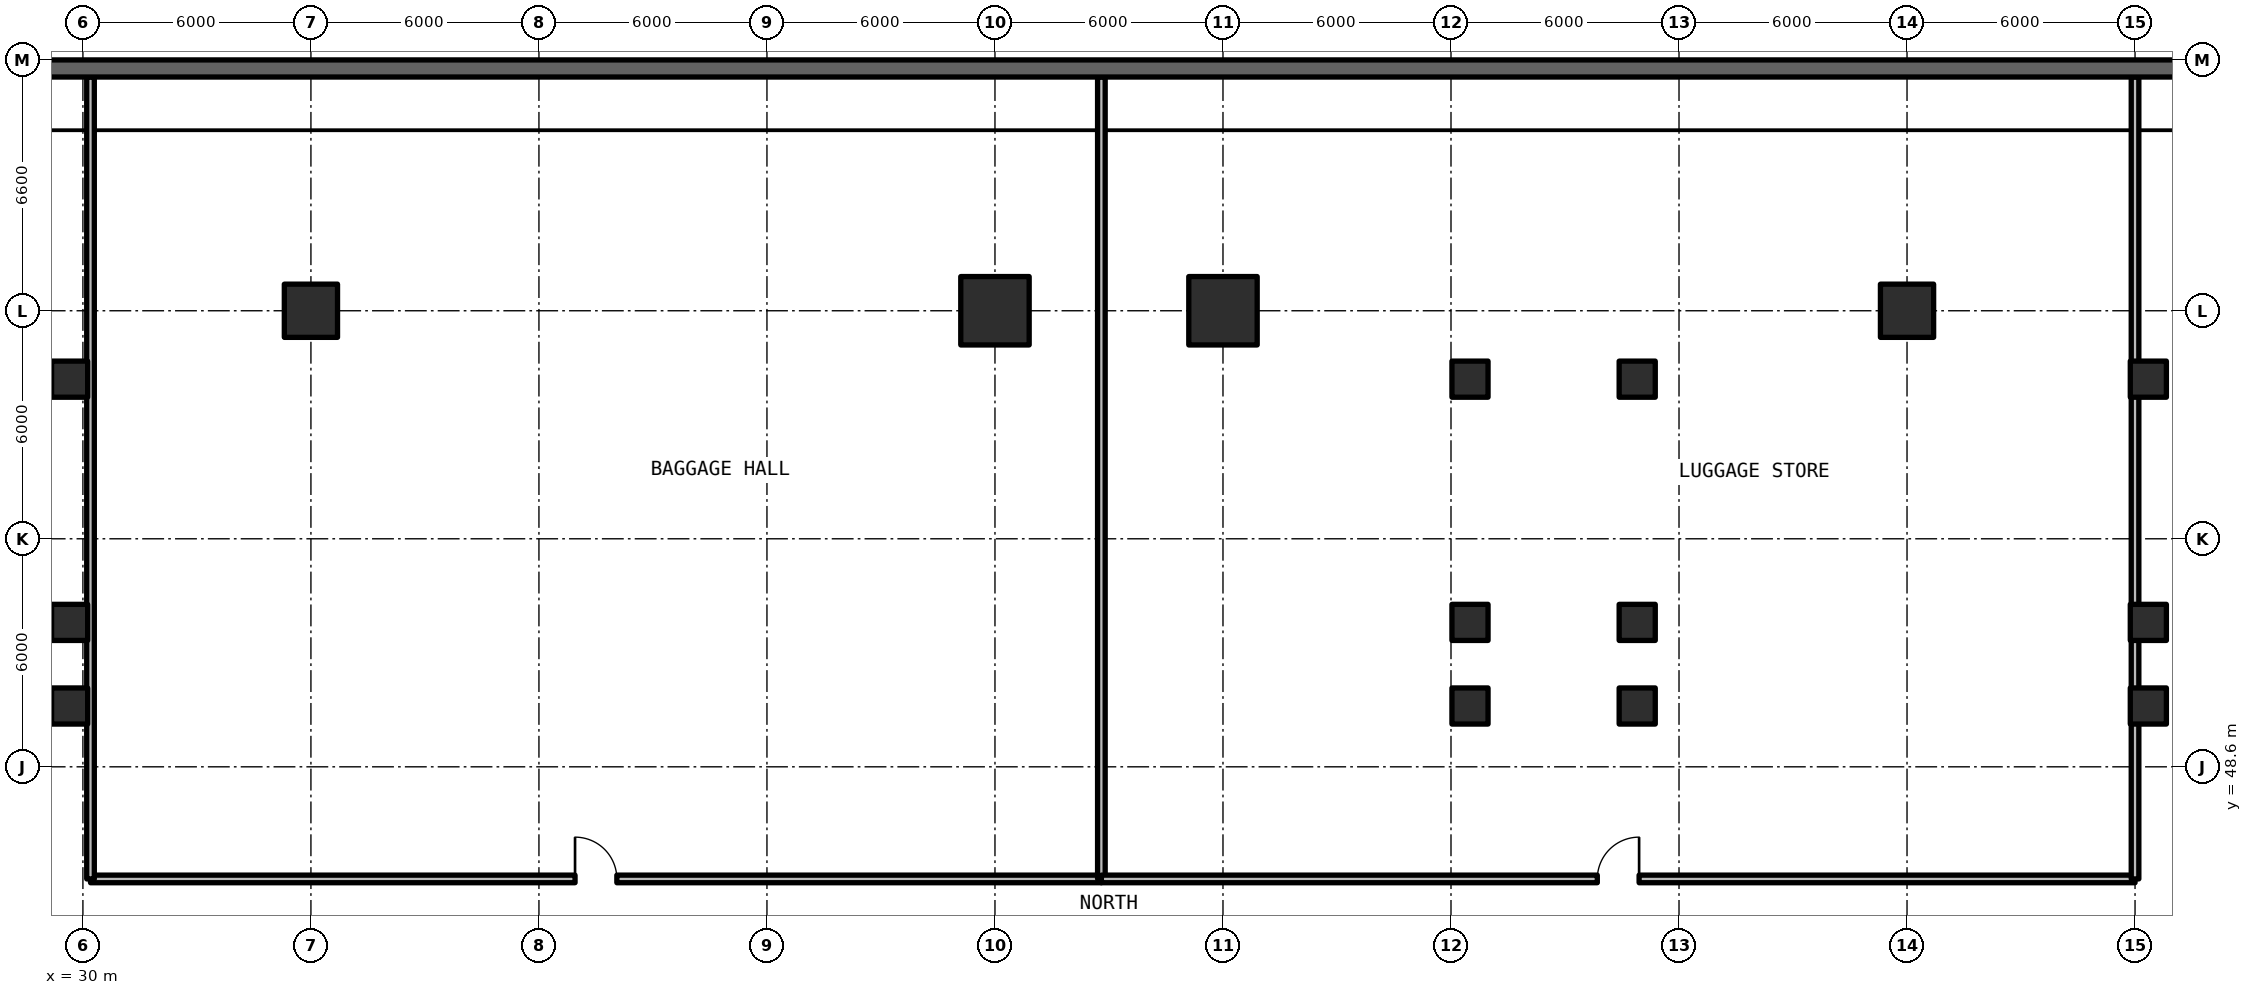
"""IFC4 building model, lengths in metres.
Left out: names, types, materials, properties, quantities, classifications, styles, units other than length and angle.
Written with IfcOpenShell. Run it as: python <this file> out.ifc"""

import sys

from ifc_helpers import new_model, si_unit, direction, frame, frame_2d, origin, origin_2d, place, context, subcontext, project, spatial, rectangle, circle, extrude, element, fill, save


model = new_model("IFC4")
c1 = context("Model", 3, precision=1e-05, world=origin(), true_north=direction((0.0, 1.0)))
c2 = subcontext(c1, "Body", "Model", "MODEL_VIEW")
j1 = project(units=[si_unit("LENGTHUNIT", "METRE"), si_unit("PLANEANGLEUNIT", "RADIAN")], contexts=[c1])
p1 = place(None, origin())
s1 = spatial("IfcSite", under=j1, at=p1, CompositionType="ELEMENT")
p2 = place(p1, origin())
s2 = spatial("IfcBuilding", under=s1, at=p2, CompositionType="ELEMENT")
p3 = place(p2, frame((0.0, 0.0, -9.24)))
s3 = spatial("IfcBuildingStorey", under=s2, at=p3, CompositionType="ELEMENT", Elevation=-9.24)
p4 = place(p3, frame((36.0, 60.6, 0.0), z_axis=(0.0, 0.0, 1.0), x_axis=(1.0, 0.0, 0.0)))
e1 = element("IfcColumn", 1, at=p4, inside=s3, PredefinedType="COLUMN", context=c2, shape_type="SweptSolid", body=[
    extrude(circle(Radius=0.7, at=origin_2d()), origin(), (0.0, 0.0, 1.0), 4.62),
])
for number, where, z_axis, x_axis in (
    (2, (54.0, 60.6, 0.0), (0.0, 0.0, 1.0), (1.0, 0.0, 0.0)),
    (3, (60.0, 60.6, 0.0), (0.0, 0.0, 1.0), (1.0, 0.0, 0.0)),
):
    element("IfcColumn", number, at=place(p3, frame(where, z_axis=z_axis, x_axis=x_axis)), inside=s3, PredefinedType="COLUMN", context=c2, shape_type="SweptSolid", body=[
        extrude(rectangle(XDim=1.8, YDim=1.8, at=origin_2d()), origin(), (0.0, 0.0, 1.0), 4.62),
    ])
p5 = place(p3, frame((78.0, 60.6, 0.0), z_axis=(0.0, 0.0, 1.0), x_axis=(1.0, 0.0, 0.0)))
e4 = element("IfcColumn", 4, at=p5, inside=s3, PredefinedType="COLUMN", context=c2, shape_type="SweptSolid", body=[
    extrude(circle(Radius=0.7, at=origin_2d()), origin(), (0.0, 0.0, 1.0), 4.62),
])
for number, where, z_axis, x_axis in (
    (5, (29.65, 52.4, 0.0), (0.0, 0.0, 1.0), (1.0, 0.0, 0.0)),
    (6, (29.65, 50.2, 0.0), (0.0, 0.0, 1.0), (1.0, 0.0, 0.0)),
    (7, (29.65, 58.8, 0.0), (0.0, 0.0, 1.0), (1.0, 0.0, 0.0)),
    (8, (66.5, 52.4, 0.0), (0.0, 0.0, 1.0), (1.0, 0.0, 0.0)),
    (9, (70.9, 52.4, 0.0), (0.0, 0.0, 1.0), (1.0, 0.0, 0.0)),
    (10, (66.5, 50.2, 0.0), (0.0, 0.0, 1.0), (1.0, 0.0, 0.0)),
    (11, (70.9, 50.2, 0.0), (0.0, 0.0, 1.0), (1.0, 0.0, 0.0)),
    (12, (70.9, 58.8, 0.0), (0.0, 0.0, 1.0), (1.0, 0.0, 0.0)),
    (13, (66.5, 58.8, 0.0), (0.0, 0.0, 1.0), (1.0, 0.0, 0.0)),
    (14, (84.35, 52.4, 0.0), (0.0, 0.0, 1.0), (1.0, 0.0, 0.0)),
    (15, (84.35, 50.2, 0.0), (0.0, 0.0, 1.0), (1.0, 0.0, 0.0)),
    (16, (84.35, 58.8, 0.0), (0.0, 0.0, 1.0), (1.0, 0.0, 0.0)),
):
    element("IfcColumn", number, at=place(p3, frame(where, z_axis=z_axis, x_axis=x_axis)), inside=s3, PredefinedType="COLUMN", context=c2, shape_type="SweptSolid", body=[
        extrude(rectangle(XDim=0.95, YDim=0.95, at=origin_2d()), origin(), (0.0, 0.0, 1.0), 4.62),
    ])
p6 = place(p3, frame((113.775, 66.975, 0.0), z_axis=(0.0, 0.0, 1.0), x_axis=(-1.0, 0.0, 0.0)))
e17 = element("IfcWall", 17, at=p6, inside=s3, PredefinedType="USERDEFINED", context=c2, shape_type="SweptSolid", body=[
    extrude(rectangle(XDim=113.55, YDim=0.45, at=frame_2d((56.775, 0.0))), origin(), (0.0, 0.0, 1.0), 4.32),
])
p7 = place(p3, frame((30.2, 45.65, 0.0), z_axis=(0.0, 0.0, 1.0), x_axis=(1.0, 0.0, 0.0)))
e18 = element("IfcWall", 18, at=p7, inside=s3, PredefinedType="SOLIDWALL", context=c2, shape_type="SweptSolid", body=[
    extrude(rectangle(XDim=26.6, YDim=0.2, at=frame_2d((13.3, 0.0))), origin(), (0.0, 0.0, 1.0), 3.54),
])
p8 = place(p7, frame((12.75, 0.0, 0.0)))
e19 = element("IfcOpeningElement", 19, at=p8, cuts=e18, PredefinedType="OPENING", context=c2, shape_type="SweptSolid", body=[
    extrude(rectangle(XDim=1.1, YDim=2.15, at=frame_2d((0.55, 1.075))), frame((0.0, 0.11, 0.0), z_axis=(0.0, -1.0, 0.0), x_axis=(1.0, 0.0, 0.0)), (0.0, 0.0, 1.0), 0.22),
])
for number, where, z_axis, x_axis in (
    (20, (30.2, 45.65, 0.0), (0.0, 0.0, 1.0), (0.0, 1.0, 0.0)),
    (21, (56.8, 45.65, 0.0), (0.0, 0.0, 1.0), (0.0, 1.0, 0.0)),
):
    element("IfcWall", number, at=place(p3, frame(where, z_axis=z_axis, x_axis=x_axis)), inside=s3, PredefinedType="SOLIDWALL", context=c2, shape_type="SweptSolid", body=[
        extrude(rectangle(XDim=21.1, YDim=0.2, at=frame_2d((10.55, 0.0))), origin(), (0.0, 0.0, 1.0), 3.54),
    ])
p9 = place(p3, frame((56.8, 45.65, 0.0), z_axis=(0.0, 0.0, 1.0), x_axis=(1.0, 0.0, 0.0)))
e22 = element("IfcWall", 22, at=p9, inside=s3, PredefinedType="SOLIDWALL", context=c2, shape_type="SweptSolid", body=[
    extrude(rectangle(XDim=27.2, YDim=0.2, at=frame_2d((13.6, 0.0))), origin(), (0.0, 0.0, 1.0), 3.54),
])
p10 = place(p9, frame((13.05, 0.0, 0.0)))
e23 = element("IfcOpeningElement", 23, at=p10, cuts=e22, PredefinedType="OPENING", context=c2, shape_type="SweptSolid", body=[
    extrude(rectangle(XDim=1.1, YDim=2.15, at=frame_2d((0.55, 1.075))), frame((0.0, 0.11, 0.0), z_axis=(0.0, -1.0, 0.0), x_axis=(1.0, 0.0, 0.0)), (0.0, 0.0, 1.0), 0.22),
])
p11 = place(p3, frame((84.0, 45.65, 0.0), z_axis=(0.0, 0.0, 1.0), x_axis=(0.0, 1.0, 0.0)))
e24 = element("IfcWall", 24, at=p11, inside=s3, PredefinedType="SOLIDWALL", context=c2, shape_type="SweptSolid", body=[
    extrude(rectangle(XDim=21.1, YDim=0.2, at=frame_2d((10.55, 0.0))), origin(), (0.0, 0.0, 1.0), 3.54),
])
p12 = place(p8, origin())
e25 = element("IfcDoor", 25, at=p12, inside=s3, OperationType="SINGLE_SWING_LEFT", PredefinedType="DOOR", context=c2, shape_type="SweptSolid", body=[
    extrude(rectangle(XDim=1.1, YDim=2.15, at=frame_2d((0.55, 1.075))), frame((0.0, 0.025, 0.0), z_axis=(0.0, -1.0, 0.0), x_axis=(1.0, 0.0, 0.0)), (0.0, 0.0, 1.0), 0.05),
])
fill(e19, e25)
p13 = place(p10, origin())
e26 = element("IfcDoor", 26, at=p13, inside=s3, OperationType="SINGLE_SWING_RIGHT", PredefinedType="DOOR", context=c2, shape_type="SweptSolid", body=[
    extrude(rectangle(XDim=1.1, YDim=2.15, at=frame_2d((0.55, 1.075))), frame((0.0, 0.025, 0.0), z_axis=(0.0, -1.0, 0.0), x_axis=(1.0, 0.0, 0.0)), (0.0, 0.0, 1.0), 0.05),
])
fill(e23, e26)
save(model, sys.argv[1])
